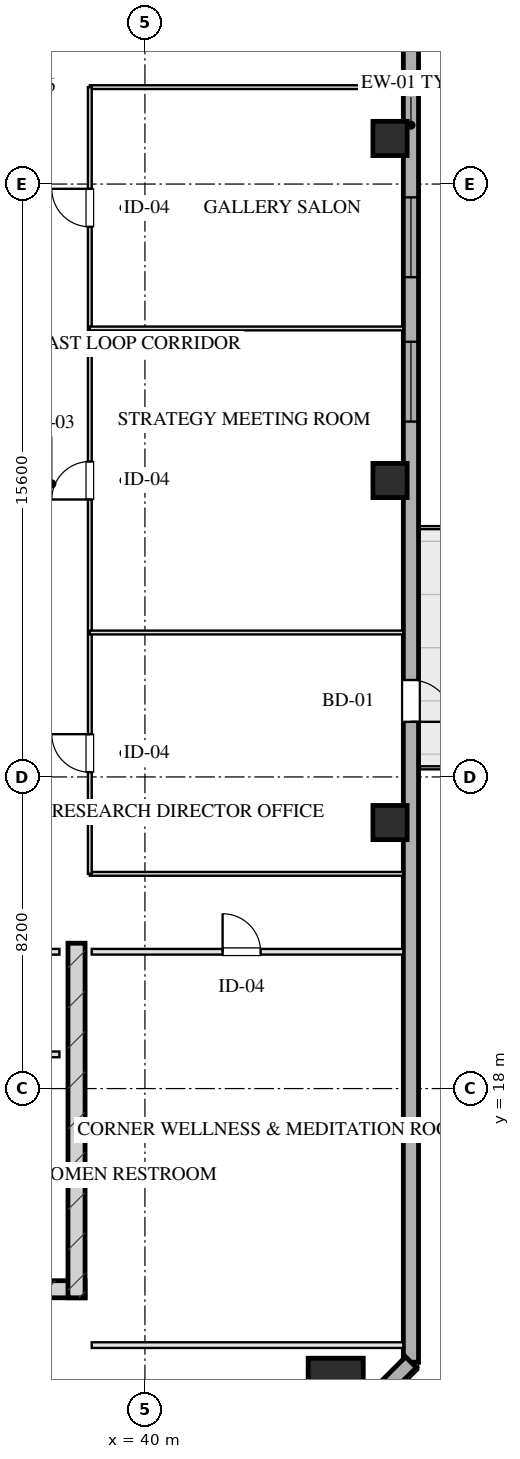
"""IFC4 building model, lengths in metres.
Left out: names, types, materials, properties, quantities, classifications, styles, units other than length and angle.
Written with IfcOpenShell. Run it as: python <this file> out.ifc"""

import sys

from ifc_helpers import new_model, si_unit, direction, frame, frame_2d, origin, origin_2d, place, context, subcontext, project, spatial, rectangle, hollow_rectangle, extrude, element, fill, save


model = new_model("IFC4")
c1 = context("Model", 3, precision=1e-05, world=origin(), true_north=direction((0.0, 1.0)))
c2 = subcontext(c1, "Body", "Model", "MODEL_VIEW")
j1 = project(units=[si_unit("LENGTHUNIT", "METRE"), si_unit("PLANEANGLEUNIT", "RADIAN")], contexts=[c1])
p1 = place(None, origin())
s1 = spatial("IfcSite", under=j1, at=p1, CompositionType="ELEMENT")
p2 = place(p1, origin())
s2 = spatial("IfcBuilding", under=s1, at=p2, CompositionType="ELEMENT")
p3 = place(p2, frame((0.0, 0.0, 209.3)))
s3 = spatial("IfcBuildingStorey", under=s2, at=p3, CompositionType="ELEMENT", Elevation=209.3)
p4 = place(p3, frame((21.575, 12.72, 0.0), z_axis=(0.0, 0.0, 1.0), x_axis=(1.0, 0.0, 0.0)))
e1 = element("IfcWall", 1, at=p4, inside=s3, PredefinedType="SHEAR", context=c2, shape_type="SweptSolid", body=[
    extrude(rectangle(XDim=16.85, YDim=0.45, at=frame_2d((8.425, 0.0))), origin(), (0.0, 0.0, 1.0), 3.45),
])
p5 = place(p3, frame((38.2, 21.825, 0.0), z_axis=(0.0, 0.0, 1.0), x_axis=(0.0, -1.0, 0.0)))
e2 = element("IfcWall", 2, at=p5, inside=s3, PredefinedType="SHEAR", context=c2, shape_type="SweptSolid", body=[
    extrude(rectangle(XDim=9.33, YDim=0.45, at=frame_2d((4.665, 0.0))), origin(), (0.0, 0.0, 1.0), 3.45),
])
p6 = place(p3, frame((45.02, 10.18, 0.0), z_axis=(0.0, 0.0, 1.0), x_axis=(1.0, 0.0, 0.0)))
e3 = element("IfcColumn", 3, at=p6, inside=s3, PredefinedType="COLUMN", context=c2, shape_type="SweptSolid", body=[
    extrude(hollow_rectangle(XDim=1.45, YDim=1.45, WallThickness=0.05, at=origin_2d()), origin(), (0.0, 0.0, 1.0), 3.451),
])
for number, where, z_axis, x_axis in (
    (4, (46.45, 25.0, 0.0), (0.0, 0.0, 1.0), (1.0, 0.0, 0.0)),
    (5, (46.45, 34.0, 0.0), (0.0, 0.0, 1.0), (1.0, 0.0, 0.0)),
    (6, (46.45, 43.0, 0.0), (0.0, 0.0, 1.0), (1.0, 0.0, 0.0)),
):
    element("IfcColumn", number, at=place(p3, frame(where, z_axis=z_axis, x_axis=x_axis)), inside=s3, PredefinedType="COLUMN", context=c2, shape_type="SweptSolid", body=[
        extrude(hollow_rectangle(XDim=0.9, YDim=0.9, WallThickness=0.032, at=origin_2d()), origin(), (0.0, 0.0, 1.0), 3.451),
    ])
p7 = place(p3, frame((47.0, 57.2, 0.0), z_axis=(0.0, 0.0, 1.0), x_axis=(0.0, -1.0, 0.0)))
e7 = element("IfcWall", 7, at=p7, inside=s3, PredefinedType="SOLIDWALL", context=c2, shape_type="SweptSolid", body=[
    extrude(rectangle(XDim=46.4, YDim=0.4, at=frame_2d((23.2, 0.0))), origin(), (0.0, 0.0, 1.0), 2.61),
])
p8 = place(p7, frame((19.55, 0.0, 0.75)))
e8 = element("IfcOpeningElement", 8, at=p8, cuts=e7, PredefinedType="OPENING", context=c2, shape_type="SweptSolid", body=[
    extrude(rectangle(XDim=2.1, YDim=1.46, at=frame_2d((1.05, 0.73))), frame((0.0, 0.21, 0.0), z_axis=(0.0, -1.0, 0.0), x_axis=(1.0, 0.0, 0.0)), (0.0, 0.0, 1.0), 0.42),
])
p9 = place(p7, frame((15.75, 0.0, 0.75)))
e9 = element("IfcOpeningElement", 9, at=p9, cuts=e7, PredefinedType="OPENING", context=c2, shape_type="SweptSolid", body=[
    extrude(rectangle(XDim=2.1, YDim=1.46, at=frame_2d((1.05, 0.73))), frame((0.0, 0.21, 0.0), z_axis=(0.0, -1.0, 0.0), x_axis=(1.0, 0.0, 0.0)), (0.0, 0.0, 1.0), 0.42),
])
p10 = place(p7, frame((28.45, 0.0, 0.0)))
e10 = element("IfcOpeningElement", 10, at=p10, cuts=e7, PredefinedType="OPENING", context=c2, shape_type="SweptSolid", body=[
    extrude(rectangle(XDim=1.1, YDim=2.15, at=frame_2d((0.55, 1.075))), frame((0.0, 0.21, 0.0), z_axis=(0.0, -1.0, 0.0), x_axis=(1.0, 0.0, 0.0)), (0.0, 0.0, 1.0), 0.42),
])
p11 = place(p3, frame((47.0, 10.8, 0.0), z_axis=(0.0, 0.0, 1.0), x_axis=(-0.707106781187, -0.707106781187, 0.0)))
e11 = element("IfcWall", 11, at=p11, inside=s3, PredefinedType="SOLIDWALL", context=c2, shape_type="SweptSolid", body=[
    extrude(rectangle(XDim=3.677, YDim=0.4, at=frame_2d((1.838, 0.0))), origin(), (0.0, 0.0, 1.0), 2.61),
])
p12 = place(p3, frame((33.95, 21.6, 0.0), z_axis=(0.0, 0.0, 1.0), x_axis=(1.0, 0.0, 0.0)))
e12 = element("IfcWall", 12, at=p12, inside=s3, PredefinedType="PARTITIONING", context=c2, shape_type="SweptSolid", body=[
    extrude(rectangle(XDim=3.8, YDim=0.15, at=frame_2d((1.9, 0.0))), origin(), (0.0, 0.0, 1.0), 3.175),
])
p13 = place(p12, frame((0.45, 0.0, 0.0)))
e13 = element("IfcOpeningElement", 13, at=p13, cuts=e12, PredefinedType="OPENING", context=c2, shape_type="SweptSolid", body=[
    extrude(rectangle(XDim=0.95, YDim=2.05, at=frame_2d((0.475, 1.025))), frame((0.0, 0.085, 0.0), z_axis=(0.0, -1.0, 0.0), x_axis=(1.0, 0.0, 0.0)), (0.0, 0.0, 1.0), 0.17),
])
p14 = place(p3, frame((33.95, 18.9, 0.0), z_axis=(0.0, 0.0, 1.0), x_axis=(1.0, 0.0, 0.0)))
e14 = element("IfcWall", 14, at=p14, inside=s3, PredefinedType="PARTITIONING", context=c2, shape_type="SweptSolid", body=[
    extrude(rectangle(XDim=3.8, YDim=0.15, at=frame_2d((1.9, 0.0))), origin(), (0.0, 0.0, 1.0), 3.175),
])
p15 = place(p14, frame((0.35, 0.0, 0.0)))
e15 = element("IfcOpeningElement", 15, at=p15, cuts=e14, PredefinedType="OPENING", context=c2, shape_type="SweptSolid", body=[
    extrude(rectangle(XDim=0.9, YDim=2.05, at=frame_2d((0.45, 1.025))), frame((0.0, 0.085, 0.0), z_axis=(0.0, -1.0, 0.0), x_axis=(1.0, 0.0, 0.0)), (0.0, 0.0, 1.0), 0.17),
])
p16 = place(p14, frame((2.1, 0.0, 0.0)))
e16 = element("IfcOpeningElement", 16, at=p16, cuts=e14, PredefinedType="OPENING", context=c2, shape_type="SweptSolid", body=[
    extrude(rectangle(XDim=0.9, YDim=2.05, at=frame_2d((0.45, 1.025))), frame((0.0, 0.085, 0.0), z_axis=(0.0, -1.0, 0.0), x_axis=(1.0, 0.0, 0.0)), (0.0, 0.0, 1.0), 0.17),
])
p17 = place(p3, frame((38.6, 11.25, 0.0), z_axis=(0.0, 0.0, 1.0), x_axis=(1.0, 0.0, 0.0)))
e17 = element("IfcWall", 17, at=p17, inside=s3, PredefinedType="PARTITIONING", context=c2, shape_type="SweptSolid", body=[
    extrude(rectangle(XDim=8.2, YDim=0.15, at=frame_2d((4.1, 0.0))), origin(), (0.0, 0.0, 1.0), 3.175),
])
p18 = place(p3, frame((38.6, 21.6, 0.0), z_axis=(0.0, 0.0, 1.0), x_axis=(1.0, 0.0, 0.0)))
e18 = element("IfcWall", 18, at=p18, inside=s3, PredefinedType="PARTITIONING", context=c2, shape_type="SweptSolid", body=[
    extrude(rectangle(XDim=8.2, YDim=0.15, at=frame_2d((4.1, 0.0))), origin(), (0.0, 0.0, 1.0), 3.175),
])
p19 = place(p18, frame((3.444, 0.0, 0.0)))
e19 = element("IfcOpeningElement", 19, at=p19, cuts=e18, PredefinedType="OPENING", context=c2, shape_type="SweptSolid", body=[
    extrude(rectangle(XDim=1.0, YDim=2.05, at=frame_2d((0.5, 1.025))), frame((0.0, 0.085, 0.0), z_axis=(0.0, -1.0, 0.0), x_axis=(1.0, 0.0, 0.0)), (0.0, 0.0, 1.0), 0.17),
])
for number, where, z_axis, x_axis in (
    (20, (38.55, 23.65, 0.0), (0.0, 0.0, 1.0), (1.0, 0.0, 0.0)),
    (21, (38.55, 44.35, 0.0), (0.0, 0.0, 1.0), (1.0, 0.0, 0.0)),
):
    element("IfcWall", number, at=place(p3, frame(where, z_axis=z_axis, x_axis=x_axis)), inside=s3, PredefinedType="MOVABLE", context=c2, shape_type="SweptSolid", body=[
        extrude(rectangle(XDim=8.25, YDim=0.1, at=frame_2d((4.125, 0.0))), origin(), (0.0, 0.0, 1.0), 3.175),
    ])
p20 = place(p3, frame((38.55, 23.65, 0.0), z_axis=(0.0, 0.0, 1.0), x_axis=(0.0, 1.0, 0.0)))
e22 = element("IfcWall", 22, at=p20, inside=s3, PredefinedType="MOVABLE", context=c2, shape_type="SweptSolid", body=[
    extrude(rectangle(XDim=20.7, YDim=0.1, at=frame_2d((10.35, 0.0))), origin(), (0.0, 0.0, 1.0), 3.175),
])
p21 = place(p20, frame((2.675, 0.0, 0.0)))
e23 = element("IfcOpeningElement", 23, at=p21, cuts=e22, PredefinedType="OPENING", context=c2, shape_type="SweptSolid", body=[
    extrude(rectangle(XDim=1.0, YDim=2.05, at=frame_2d((0.5, 1.025))), frame((0.0, 0.06, 0.0), z_axis=(0.0, -1.0, 0.0), x_axis=(1.0, 0.0, 0.0)), (0.0, 0.0, 1.0), 0.12),
])
p22 = place(p20, frame((9.85, 0.0, 0.0)))
e24 = element("IfcOpeningElement", 24, at=p22, cuts=e22, PredefinedType="OPENING", context=c2, shape_type="SweptSolid", body=[
    extrude(rectangle(XDim=1.0, YDim=2.05, at=frame_2d((0.5, 1.025))), frame((0.0, 0.06, 0.0), z_axis=(0.0, -1.0, 0.0), x_axis=(1.0, 0.0, 0.0)), (0.0, 0.0, 1.0), 0.12),
])
p23 = place(p20, frame((17.025, 0.0, 0.0)))
e25 = element("IfcOpeningElement", 25, at=p23, cuts=e22, PredefinedType="OPENING", context=c2, shape_type="SweptSolid", body=[
    extrude(rectangle(XDim=1.0, YDim=2.05, at=frame_2d((0.5, 1.025))), frame((0.0, 0.06, 0.0), z_axis=(0.0, -1.0, 0.0), x_axis=(1.0, 0.0, 0.0)), (0.0, 0.0, 1.0), 0.12),
])
for number, where, z_axis, x_axis in (
    (26, (38.55, 30.0, 0.0), (0.0, 0.0, 1.0), (1.0, 0.0, 0.0)),
    (27, (38.55, 38.0, 0.0), (0.0, 0.0, 1.0), (1.0, 0.0, 0.0)),
):
    element("IfcWall", number, at=place(p3, frame(where, z_axis=z_axis, x_axis=x_axis)), inside=s3, PredefinedType="MOVABLE", context=c2, shape_type="SweptSolid", body=[
        extrude(rectangle(XDim=8.25, YDim=0.1, at=frame_2d((4.125, 0.0))), origin(), (0.0, 0.0, 1.0), 3.175),
    ])
p24 = place(p8, origin())
e28 = element("IfcWindow", 28, at=p24, inside=s3, PartitioningType="TRIPLE_PANEL_VERTICAL", PredefinedType="WINDOW", context=c2, shape_type="SweptSolid", body=[
    extrude(rectangle(XDim=2.1, YDim=1.46, at=frame_2d((1.05, 0.73))), frame((0.0, 0.03, 0.0), z_axis=(0.0, -1.0, 0.0), x_axis=(1.0, 0.0, 0.0)), (0.0, 0.0, 1.0), 0.06),
])
fill(e8, e28)
p25 = place(p9, origin())
e29 = element("IfcWindow", 29, at=p25, inside=s3, PartitioningType="TRIPLE_PANEL_VERTICAL", PredefinedType="WINDOW", context=c2, shape_type="SweptSolid", body=[
    extrude(rectangle(XDim=2.1, YDim=1.46, at=frame_2d((1.05, 0.73))), frame((0.0, 0.03, 0.0), z_axis=(0.0, -1.0, 0.0), x_axis=(1.0, 0.0, 0.0)), (0.0, 0.0, 1.0), 0.06),
])
fill(e9, e29)
p26 = place(p10, origin())
e30 = element("IfcDoor", 30, at=p26, inside=s3, OperationType="SINGLE_SWING_RIGHT", PredefinedType="DOOR", context=c2, shape_type="SweptSolid", body=[
    extrude(rectangle(XDim=1.1, YDim=2.15, at=frame_2d((0.55, 1.075))), frame((0.0, 0.025, 0.0), z_axis=(0.0, -1.0, 0.0), x_axis=(1.0, 0.0, 0.0)), (0.0, 0.0, 1.0), 0.05),
])
fill(e10, e30)
p27 = place(p19, origin())
e31 = element("IfcDoor", 31, at=p27, inside=s3, OperationType="SINGLE_SWING_LEFT", PredefinedType="DOOR", context=c2, shape_type="SweptSolid", body=[
    extrude(rectangle(XDim=1.0, YDim=2.05, at=frame_2d((0.5, 1.025))), frame((0.0, 0.025, 0.0), z_axis=(0.0, -1.0, 0.0), x_axis=(1.0, 0.0, 0.0)), (0.0, 0.0, 1.0), 0.05),
])
fill(e19, e31)
p28 = place(p21, origin())
e32 = element("IfcDoor", 32, at=p28, inside=s3, OperationType="SINGLE_SWING_RIGHT", PredefinedType="DOOR", context=c2, shape_type="SweptSolid", body=[
    extrude(rectangle(XDim=1.0, YDim=2.05, at=frame_2d((0.5, 1.025))), frame((0.0, 0.025, 0.0), z_axis=(0.0, -1.0, 0.0), x_axis=(1.0, 0.0, 0.0)), (0.0, 0.0, 1.0), 0.05),
])
fill(e23, e32)
p29 = place(p22, origin())
e33 = element("IfcDoor", 33, at=p29, inside=s3, OperationType="SINGLE_SWING_LEFT", PredefinedType="DOOR", context=c2, shape_type="SweptSolid", body=[
    extrude(rectangle(XDim=1.0, YDim=2.05, at=frame_2d((0.5, 1.025))), frame((0.0, 0.025, 0.0), z_axis=(0.0, -1.0, 0.0), x_axis=(1.0, 0.0, 0.0)), (0.0, 0.0, 1.0), 0.05),
])
fill(e24, e33)
p30 = place(p23, origin())
e34 = element("IfcDoor", 34, at=p30, inside=s3, OperationType="SINGLE_SWING_RIGHT", PredefinedType="DOOR", context=c2, shape_type="SweptSolid", body=[
    extrude(rectangle(XDim=1.0, YDim=2.05, at=frame_2d((0.5, 1.025))), frame((0.0, 0.025, 0.0), z_axis=(0.0, -1.0, 0.0), x_axis=(1.0, 0.0, 0.0)), (0.0, 0.0, 1.0), 0.05),
])
fill(e25, e34)
save(model, sys.argv[1])
